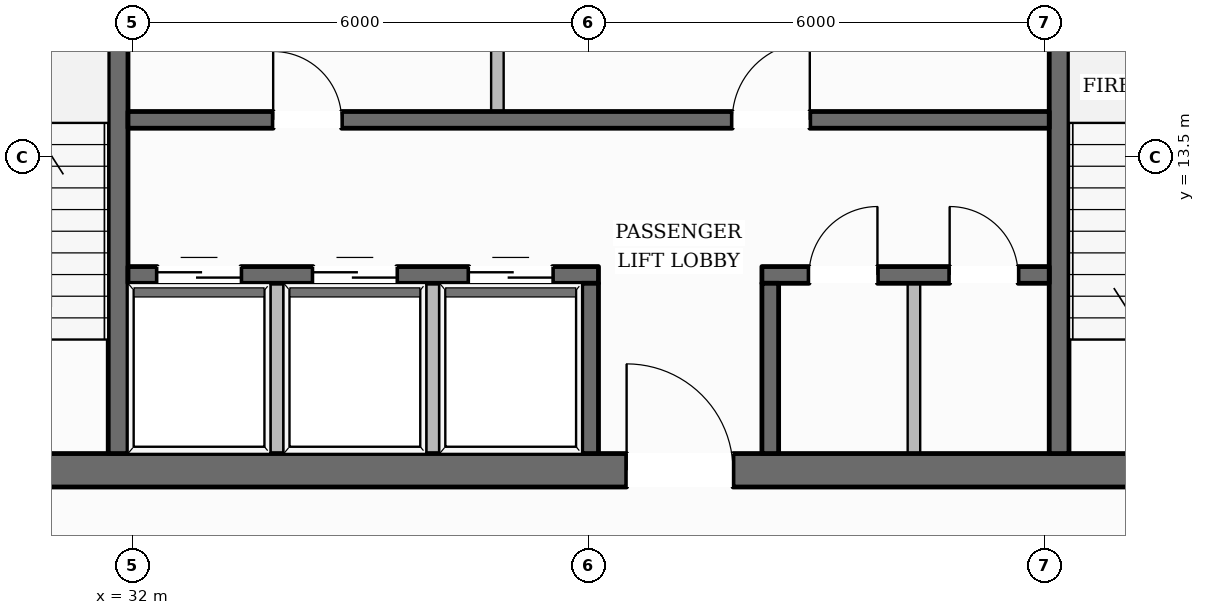
"""IFC4 building model, lengths in metres.
Left out: names, types, materials, properties, quantities, classifications, styles, units other than length and angle.
Written with IfcOpenShell. Run it as: python <this file> out.ifc"""

import sys

from ifc_helpers import new_model, si_unit, direction, frame, frame_2d, origin, place, context, subcontext, project, spatial, rectangle, extrude, element, fill, save


model = new_model("IFC4")
c1 = context("Model", 3, precision=1e-05, world=origin(), true_north=direction((0.0, 1.0)))
c2 = subcontext(c1, "Body", "Model", "MODEL_VIEW")
j1 = project(units=[si_unit("LENGTHUNIT", "METRE"), si_unit("PLANEANGLEUNIT", "RADIAN")], contexts=[c1])
p1 = place(None, origin())
s1 = spatial("IfcSite", under=j1, at=p1, CompositionType="ELEMENT")
p2 = place(p1, origin())
s2 = spatial("IfcBuilding", under=s1, at=p2, CompositionType="ELEMENT")
p3 = place(p2, frame((0.0, 0.0, 168.85)))
s3 = spatial("IfcBuildingStorey", under=s2, at=p3, CompositionType="ELEMENT", Elevation=168.85)
p4 = place(p3, frame((28.04, 9.38, 0.0), z_axis=(0.0, 0.0, 1.0), x_axis=(1.0, 0.0, 0.0)))
e1 = element("IfcWall", 1, at=p4, inside=s3, PredefinedType="SOLIDWALL", context=c2, shape_type="SweptSolid", body=[
    extrude(rectangle(XDim=19.92, YDim=0.44, at=frame_2d((9.96, 0.0))), origin(), (0.0, 0.0, 1.0), 3.6),
])
p5 = place(p4, frame((10.46, 0.0, 0.0)))
e2 = element("IfcOpeningElement", 2, at=p5, cuts=e1, PredefinedType="OPENING", context=c2, shape_type="SweptSolid", body=[
    extrude(rectangle(XDim=1.4, YDim=2.2, at=frame_2d((0.7, 1.1))), frame((0.0, 0.23, 0.0), z_axis=(0.0, -1.0, 0.0), x_axis=(1.0, 0.0, 0.0)), (0.0, 0.0, 1.0), 0.46),
])
p6 = place(p3, frame((31.81, 9.6, 0.0), z_axis=(0.0, 0.0, 1.0), x_axis=(0.0, 1.0, 0.0)))
e3 = element("IfcWall", 3, at=p6, inside=s3, PredefinedType="SHEAR", context=c2, shape_type="SweptSolid", body=[
    extrude(rectangle(XDim=13.0, YDim=0.26, at=frame_2d((6.5, 0.0))), origin(), (0.0, 0.0, 1.0), 3.6),
])
p7 = place(p6, frame((10.925, 0.0, 0.0)))
e4 = element("IfcOpeningElement", 4, at=p7, cuts=e3, PredefinedType="OPENING", context=c2, shape_type="SweptSolid", body=[
    extrude(rectangle(XDim=1.25, YDim=2.25, at=frame_2d((0.625, 1.125))), frame((0.0, 0.14, 0.0), z_axis=(0.0, -1.0, 0.0), x_axis=(1.0, 0.0, 0.0)), (0.0, 0.0, 1.0), 0.28),
])
p8 = place(p3, frame((44.19, 9.6, 0.0), z_axis=(0.0, 0.0, 1.0), x_axis=(0.0, 1.0, 0.0)))
e5 = element("IfcWall", 5, at=p8, inside=s3, PredefinedType="SHEAR", context=c2, shape_type="SweptSolid", body=[
    extrude(rectangle(XDim=13.0, YDim=0.26, at=frame_2d((6.5, 0.0))), origin(), (0.0, 0.0, 1.0), 3.6),
])
p9 = place(p8, frame((10.925, 0.0, 0.0)))
e6 = element("IfcOpeningElement", 6, at=p9, cuts=e5, PredefinedType="OPENING", context=c2, shape_type="SweptSolid", body=[
    extrude(rectangle(XDim=1.25, YDim=2.25, at=frame_2d((0.625, 1.125))), frame((0.0, 0.14, 0.0), z_axis=(0.0, -1.0, 0.0), x_axis=(1.0, 0.0, 0.0)), (0.0, 0.0, 1.0), 0.28),
])
p10 = place(p3, frame((31.94, 13.99, 0.0), z_axis=(0.0, 0.0, 1.0), x_axis=(1.0, 0.0, 0.0)))
e7 = element("IfcWall", 7, at=p10, inside=s3, PredefinedType="SOLIDWALL", context=c2, shape_type="SweptSolid", body=[
    extrude(rectangle(XDim=12.12, YDim=0.22, at=frame_2d((6.06, 0.0))), origin(), (0.0, 0.0, 1.0), 3.6),
])
p11 = place(p10, frame((1.91, 0.0, 0.0)))
e8 = element("IfcOpeningElement", 8, at=p11, cuts=e7, PredefinedType="OPENING", context=c2, shape_type="SweptSolid", body=[
    extrude(rectangle(XDim=0.9, YDim=2.1, at=frame_2d((0.45, 1.05))), frame((0.0, 0.12, 0.0), z_axis=(0.0, -1.0, 0.0), x_axis=(1.0, 0.0, 0.0)), (0.0, 0.0, 1.0), 0.24),
])
p12 = place(p10, frame((7.95, 0.0, 0.0)))
e9 = element("IfcOpeningElement", 9, at=p12, cuts=e7, PredefinedType="OPENING", context=c2, shape_type="SweptSolid", body=[
    extrude(rectangle(XDim=1.02, YDim=2.15, at=frame_2d((0.51, 1.075))), frame((0.0, 0.12, 0.0), z_axis=(0.0, -1.0, 0.0), x_axis=(1.0, 0.0, 0.0)), (0.0, 0.0, 1.0), 0.24),
])
p13 = place(p3, frame((31.94, 11.95, 0.0), z_axis=(0.0, 0.0, 1.0), x_axis=(1.0, 0.0, 0.0)))
e10 = element("IfcWall", 10, at=p13, inside=s3, PredefinedType="SOLIDWALL", context=c2, shape_type="SweptSolid", body=[
    extrude(rectangle(XDim=6.19, YDim=0.22, at=frame_2d((3.095, 0.0))), origin(), (0.0, 0.0, 1.0), 3.6),
])
p14 = place(p13, frame((0.385, 0.0, 0.0)))
e11 = element("IfcOpeningElement", 11, at=p14, cuts=e10, PredefinedType="OPENING", context=c2, shape_type="SweptSolid", body=[
    extrude(rectangle(XDim=1.1, YDim=2.2, at=frame_2d((0.55, 1.1))), frame((0.0, 0.12, 0.0), z_axis=(0.0, -1.0, 0.0), x_axis=(1.0, 0.0, 0.0)), (0.0, 0.0, 1.0), 0.24),
])
p15 = place(p13, frame((2.435, 0.0, 0.0)))
e12 = element("IfcOpeningElement", 12, at=p15, cuts=e10, PredefinedType="OPENING", context=c2, shape_type="SweptSolid", body=[
    extrude(rectangle(XDim=1.1, YDim=2.2, at=frame_2d((0.55, 1.1))), frame((0.0, 0.12, 0.0), z_axis=(0.0, -1.0, 0.0), x_axis=(1.0, 0.0, 0.0)), (0.0, 0.0, 1.0), 0.24),
])
p16 = place(p13, frame((4.485, 0.0, 0.0)))
e13 = element("IfcOpeningElement", 13, at=p16, cuts=e10, PredefinedType="OPENING", context=c2, shape_type="SweptSolid", body=[
    extrude(rectangle(XDim=1.1, YDim=2.2, at=frame_2d((0.55, 1.1))), frame((0.0, 0.12, 0.0), z_axis=(0.0, -1.0, 0.0), x_axis=(1.0, 0.0, 0.0)), (0.0, 0.0, 1.0), 0.24),
])
p17 = place(p3, frame((40.28, 11.95, 0.0), z_axis=(0.0, 0.0, 1.0), x_axis=(1.0, 0.0, 0.0)))
e14 = element("IfcWall", 14, at=p17, inside=s3, PredefinedType="SOLIDWALL", context=c2, shape_type="SweptSolid", body=[
    extrude(rectangle(XDim=3.78, YDim=0.22, at=frame_2d((1.89, 0.0))), origin(), (0.0, 0.0, 1.0), 3.6),
])
p18 = place(p17, frame((0.62, 0.0, 0.0)))
e15 = element("IfcOpeningElement", 15, at=p18, cuts=e14, PredefinedType="OPENING", context=c2, shape_type="SweptSolid", body=[
    extrude(rectangle(XDim=0.9, YDim=2.1, at=frame_2d((0.45, 1.05))), frame((0.0, 0.12, 0.0), z_axis=(0.0, -1.0, 0.0), x_axis=(1.0, 0.0, 0.0)), (0.0, 0.0, 1.0), 0.24),
])
p19 = place(p17, frame((2.47, 0.0, 0.0)))
e16 = element("IfcOpeningElement", 16, at=p19, cuts=e14, PredefinedType="OPENING", context=c2, shape_type="SweptSolid", body=[
    extrude(rectangle(XDim=0.9, YDim=2.1, at=frame_2d((0.45, 1.05))), frame((0.0, 0.12, 0.0), z_axis=(0.0, -1.0, 0.0), x_axis=(1.0, 0.0, 0.0)), (0.0, 0.0, 1.0), 0.24),
])
for number, where, z_axis, x_axis in (
    (17, (38.02, 9.6, 0.0), (0.0, 0.0, 1.0), (0.0, 1.0, 0.0)),
    (18, (40.39, 9.6, 0.0), (0.0, 0.0, 1.0), (0.0, 1.0, 0.0)),
):
    element("IfcWall", number, at=place(p3, frame(where, z_axis=z_axis, x_axis=x_axis)), inside=s3, PredefinedType="SOLIDWALL", context=c2, shape_type="SweptSolid", body=[
        extrude(rectangle(XDim=2.24, YDim=0.22, at=frame_2d((1.12, 0.0))), origin(), (0.0, 0.0, 1.0), 3.6),
    ])
p20 = place(p3, frame((15.072, 12.292, 0.0), z_axis=(0.0, 0.0, 1.0), x_axis=(0.492336574501, 0.870404904288, 0.0)))
e19 = element("IfcWall", 19, at=p20, inside=s3, PredefinedType="STANDARD", context=c2, shape_type="SweptSolid", body=[
    extrude(rectangle(XDim=37.15, YDim=0.35, at=frame_2d((18.575, 0.0))), origin(), (0.0, 0.0, 1.0), 3.132),
])
p21 = place(p20, frame((8.888, 0.0, 0.0)))
e20 = element("IfcOpeningElement", 20, at=p21, cuts=e19, PredefinedType="OPENING", context=c2, shape_type="SweptSolid", body=[
    extrude(rectangle(XDim=1.0, YDim=2.2, at=frame_2d((0.5, 1.1))), frame((0.0, 0.185, 0.0), z_axis=(0.0, -1.0, 0.0), x_axis=(1.0, 0.0, 0.0)), (0.0, 0.0, 1.0), 0.37),
])
p22 = place(p20, frame((32.928, 0.0, 0.65)))
e21 = element("IfcOpeningElement", 21, at=p22, cuts=e19, PredefinedType="OPENING", context=c2, shape_type="SweptSolid", body=[
    extrude(rectangle(XDim=1.45, YDim=1.75, at=frame_2d((0.725, 0.875))), frame((0.0, 0.185, 0.0), z_axis=(0.0, -1.0, 0.0), x_axis=(1.0, 0.0, 0.0)), (0.0, 0.0, 1.0), 0.37),
])
p23 = place(p20, frame((26.895, 0.0, 0.65)))
e22 = element("IfcOpeningElement", 22, at=p23, cuts=e19, PredefinedType="OPENING", context=c2, shape_type="SweptSolid", body=[
    extrude(rectangle(XDim=1.45, YDim=1.75, at=frame_2d((0.725, 0.875))), frame((0.0, 0.185, 0.0), z_axis=(0.0, -1.0, 0.0), x_axis=(1.0, 0.0, 0.0)), (0.0, 0.0, 1.0), 0.37),
])
p24 = place(p20, frame((20.862, 0.0, 0.65)))
e23 = element("IfcOpeningElement", 23, at=p24, cuts=e19, PredefinedType="OPENING", context=c2, shape_type="SweptSolid", body=[
    extrude(rectangle(XDim=1.45, YDim=1.75, at=frame_2d((0.725, 0.875))), frame((0.0, 0.185, 0.0), z_axis=(0.0, -1.0, 0.0), x_axis=(1.0, 0.0, 0.0)), (0.0, 0.0, 1.0), 0.37),
])
p25 = place(p20, frame((2.764, 0.0, 0.65)))
e24 = element("IfcOpeningElement", 24, at=p25, cuts=e19, PredefinedType="OPENING", context=c2, shape_type="SweptSolid", body=[
    extrude(rectangle(XDim=1.45, YDim=1.75, at=frame_2d((0.725, 0.875))), frame((0.0, 0.185, 0.0), z_axis=(0.0, -1.0, 0.0), x_axis=(1.0, 0.0, 0.0)), (0.0, 0.0, 1.0), 0.37),
])
p26 = place(p3, frame((42.696, 44.593, 0.0), z_axis=(0.0, 0.0, 1.0), x_axis=(0.495321099056, -0.868709968188, 0.0)))
e25 = element("IfcWall", 25, at=p26, inside=s3, PredefinedType="STANDARD", context=c2, shape_type="SweptSolid", body=[
    extrude(rectangle(XDim=37.366, YDim=0.35, at=frame_2d((18.683, 0.0))), origin(), (0.0, 0.0, 1.0), 3.132),
])
p27 = place(p26, frame((33.134, 0.0, 0.65)))
e26 = element("IfcOpeningElement", 26, at=p27, cuts=e25, PredefinedType="OPENING", context=c2, shape_type="SweptSolid", body=[
    extrude(rectangle(XDim=1.45, YDim=1.75, at=frame_2d((0.725, 0.875))), frame((0.0, 0.185, 0.0), z_axis=(0.0, -1.0, 0.0), x_axis=(1.0, 0.0, 0.0)), (0.0, 0.0, 1.0), 0.37),
])
p28 = place(p26, frame((27.065, 0.0, 0.65)))
e27 = element("IfcOpeningElement", 27, at=p28, cuts=e25, PredefinedType="OPENING", context=c2, shape_type="SweptSolid", body=[
    extrude(rectangle(XDim=1.45, YDim=1.75, at=frame_2d((0.725, 0.875))), frame((0.0, 0.185, 0.0), z_axis=(0.0, -1.0, 0.0), x_axis=(1.0, 0.0, 0.0)), (0.0, 0.0, 1.0), 0.37),
])
p29 = place(p26, frame((20.995, 0.0, 0.65)))
e28 = element("IfcOpeningElement", 28, at=p29, cuts=e25, PredefinedType="OPENING", context=c2, shape_type="SweptSolid", body=[
    extrude(rectangle(XDim=1.45, YDim=1.75, at=frame_2d((0.725, 0.875))), frame((0.0, 0.185, 0.0), z_axis=(0.0, -1.0, 0.0), x_axis=(1.0, 0.0, 0.0)), (0.0, 0.0, 1.0), 0.37),
])
p30 = place(p26, frame((8.857, 0.0, 0.65)))
e29 = element("IfcOpeningElement", 29, at=p30, cuts=e25, PredefinedType="OPENING", context=c2, shape_type="SweptSolid", body=[
    extrude(rectangle(XDim=1.45, YDim=1.75, at=frame_2d((0.725, 0.875))), frame((0.0, 0.185, 0.0), z_axis=(0.0, -1.0, 0.0), x_axis=(1.0, 0.0, 0.0)), (0.0, 0.0, 1.0), 0.37),
])
p31 = place(p26, frame((2.787, 0.0, 0.65)))
e30 = element("IfcOpeningElement", 30, at=p31, cuts=e25, PredefinedType="OPENING", context=c2, shape_type="SweptSolid", body=[
    extrude(rectangle(XDim=1.45, YDim=1.75, at=frame_2d((0.725, 0.875))), frame((0.0, 0.185, 0.0), z_axis=(0.0, -1.0, 0.0), x_axis=(1.0, 0.0, 0.0)), (0.0, 0.0, 1.0), 0.37),
])
for number, where, z_axis, x_axis in (
    (31, (33.9, 9.52, 0.0), (0.0, 0.0, 1.0), (0.0, 1.0, 0.0)),
    (32, (35.95, 9.52, 0.0), (0.0, 0.0, 1.0), (0.0, 1.0, 0.0)),
):
    element("IfcWall", number, at=place(p3, frame(where, z_axis=z_axis, x_axis=x_axis)), inside=s3, PredefinedType="PARTITIONING", context=c2, shape_type="SweptSolid", body=[
        extrude(rectangle(XDim=2.32, YDim=0.165, at=frame_2d((1.16, 0.0))), origin(), (0.0, 0.0, 1.0), 3.6),
    ])
p32 = place(p3, frame((36.8, 14.1, 0.0), z_axis=(0.0, 0.0, 1.0), x_axis=(0.0, 1.0, 0.0)))
e33 = element("IfcWall", 33, at=p32, inside=s3, PredefinedType="PARTITIONING", context=c2, shape_type="SweptSolid", body=[
    extrude(rectangle(XDim=2.24, YDim=0.165, at=frame_2d((1.12, 0.0))), origin(), (0.0, 0.0, 1.0), 3.6),
])
p33 = place(p3, frame((42.28, 9.52, 0.0), z_axis=(0.0, 0.0, 1.0), x_axis=(0.0, 1.0, 0.0)))
e34 = element("IfcWall", 34, at=p33, inside=s3, PredefinedType="PARTITIONING", context=c2, shape_type="SweptSolid", body=[
    extrude(rectangle(XDim=2.32, YDim=0.165, at=frame_2d((1.16, 0.0))), origin(), (0.0, 0.0, 1.0), 3.6),
])
p34 = place(p5, origin())
e35 = element("IfcDoor", 35, at=p34, inside=s3, OperationType="SINGLE_SWING_LEFT", PredefinedType="DOOR", context=c2, shape_type="SweptSolid", body=[
    extrude(rectangle(XDim=1.4, YDim=2.2, at=frame_2d((0.7, 1.1))), frame((0.0, 0.025, 0.0), z_axis=(0.0, -1.0, 0.0), x_axis=(1.0, 0.0, 0.0)), (0.0, 0.0, 1.0), 0.05),
])
fill(e2, e35)
p35 = place(p14, origin())
e36 = element("IfcDoor", 36, at=p35, inside=s3, OperationType="DOUBLE_DOOR_SLIDING", PredefinedType="DOOR", context=c2, shape_type="SweptSolid", body=[
    extrude(rectangle(XDim=1.1, YDim=2.2, at=frame_2d((0.55, 1.1))), frame((0.0, 0.025, 0.0), z_axis=(0.0, -1.0, 0.0), x_axis=(1.0, 0.0, 0.0)), (0.0, 0.0, 1.0), 0.05),
])
fill(e11, e36)
p36 = place(p15, origin())
e37 = element("IfcDoor", 37, at=p36, inside=s3, OperationType="DOUBLE_DOOR_SLIDING", PredefinedType="DOOR", context=c2, shape_type="SweptSolid", body=[
    extrude(rectangle(XDim=1.1, YDim=2.2, at=frame_2d((0.55, 1.1))), frame((0.0, 0.025, 0.0), z_axis=(0.0, -1.0, 0.0), x_axis=(1.0, 0.0, 0.0)), (0.0, 0.0, 1.0), 0.05),
])
fill(e12, e37)
p37 = place(p16, origin())
e38 = element("IfcDoor", 38, at=p37, inside=s3, OperationType="DOUBLE_DOOR_SLIDING", PredefinedType="DOOR", context=c2, shape_type="SweptSolid", body=[
    extrude(rectangle(XDim=1.1, YDim=2.2, at=frame_2d((0.55, 1.1))), frame((0.0, 0.025, 0.0), z_axis=(0.0, -1.0, 0.0), x_axis=(1.0, 0.0, 0.0)), (0.0, 0.0, 1.0), 0.05),
])
fill(e13, e38)
p38 = place(p11, origin())
e39 = element("IfcDoor", 39, at=p38, inside=s3, OperationType="SINGLE_SWING_LEFT", PredefinedType="DOOR", context=c2, shape_type="SweptSolid", body=[
    extrude(rectangle(XDim=0.9, YDim=2.1, at=frame_2d((0.45, 1.05))), frame((0.0, 0.025, 0.0), z_axis=(0.0, -1.0, 0.0), x_axis=(1.0, 0.0, 0.0)), (0.0, 0.0, 1.0), 0.05),
])
fill(e8, e39)
p39 = place(p12, origin())
e40 = element("IfcDoor", 40, at=p39, inside=s3, OperationType="SINGLE_SWING_RIGHT", PredefinedType="DOOR", context=c2, shape_type="SweptSolid", body=[
    extrude(rectangle(XDim=1.02, YDim=2.15, at=frame_2d((0.51, 1.075))), frame((0.0, 0.025, 0.0), z_axis=(0.0, -1.0, 0.0), x_axis=(1.0, 0.0, 0.0)), (0.0, 0.0, 1.0), 0.05),
])
fill(e9, e40)
p40 = place(p18, origin())
e41 = element("IfcDoor", 41, at=p40, inside=s3, OperationType="SINGLE_SWING_RIGHT", PredefinedType="DOOR", context=c2, shape_type="SweptSolid", body=[
    extrude(rectangle(XDim=0.9, YDim=2.1, at=frame_2d((0.45, 1.05))), frame((0.0, 0.025, 0.0), z_axis=(0.0, -1.0, 0.0), x_axis=(1.0, 0.0, 0.0)), (0.0, 0.0, 1.0), 0.05),
])
fill(e15, e41)
p41 = place(p19, origin())
e42 = element("IfcDoor", 42, at=p41, inside=s3, OperationType="SINGLE_SWING_LEFT", PredefinedType="DOOR", context=c2, shape_type="SweptSolid", body=[
    extrude(rectangle(XDim=0.9, YDim=2.1, at=frame_2d((0.45, 1.05))), frame((0.0, 0.025, 0.0), z_axis=(0.0, -1.0, 0.0), x_axis=(1.0, 0.0, 0.0)), (0.0, 0.0, 1.0), 0.05),
])
fill(e16, e42)
save(model, sys.argv[1])
